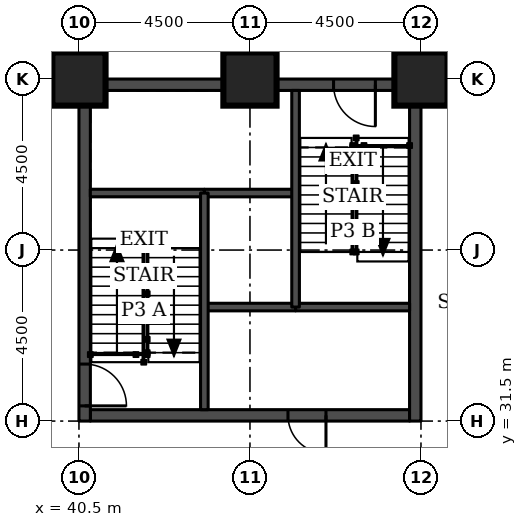
"""IFC4 building model, lengths in metres.
Left out: names, types, materials, properties, quantities, classifications, styles, units other than length and angle.
Written with IfcOpenShell. Run it as: python <this file> out.ifc"""

import sys

from ifc_helpers import new_model, si_unit, direction, frame, frame_2d, origin, origin_2d, place, context, subcontext, project, spatial, rectangle, extrude, element, fill, save


model = new_model("IFC4")
c1 = context("Model", 3, precision=1e-05, world=origin(), true_north=direction((0.0, 1.0)))
c2 = subcontext(c1, "Body", "Model", "MODEL_VIEW")
j1 = project(units=[si_unit("LENGTHUNIT", "METRE"), si_unit("PLANEANGLEUNIT", "RADIAN")], contexts=[c1])
p1 = place(None, origin())
s1 = spatial("IfcSite", under=j1, at=p1, CompositionType="ELEMENT")
p2 = place(p1, origin())
s2 = spatial("IfcBuilding", under=s1, at=p2, CompositionType="ELEMENT")
p3 = place(p2, frame((0.0, 0.0, -4.5)))
s3 = spatial("IfcBuildingStorey", under=s2, at=p3, CompositionType="ELEMENT", Elevation=-4.5)
for number, where, z_axis, x_axis in (
    (1, (40.5, 40.5, 0.0), (0.0, 0.0, 1.0), (1.0, 0.0, 0.0)),
    (2, (45.0, 40.5, 0.0), (0.0, 0.0, 1.0), (1.0, 0.0, 0.0)),
    (3, (49.5, 40.5, 0.0), (0.0, 0.0, 1.0), (1.0, 0.0, 0.0)),
):
    element("IfcColumn", number, at=place(p3, frame(where, z_axis=z_axis, x_axis=x_axis)), inside=s3, PredefinedType="COLUMN", context=c2, shape_type="SweptSolid", body=[
        extrude(rectangle(XDim=1.4, YDim=1.4, at=origin_2d()), origin(), (0.0, 0.0, 1.0), 4.5),
    ])
p4 = place(p3, frame((40.8, 31.65, 0.0), z_axis=(0.0, 0.0, 1.0), x_axis=(1.0, 0.0, 0.0)))
e4 = element("IfcWall", 4, at=p4, inside=s3, PredefinedType="SHEAR", context=c2, shape_type="SweptSolid", body=[
    extrude(rectangle(XDim=8.4, YDim=0.3, at=frame_2d((4.2, 0.0))), origin(), (0.0, 0.0, 1.0), 4.5),
])
p5 = place(p4, frame((5.2, 0.0, 0.0)))
e5 = element("IfcOpeningElement", 5, at=p5, cuts=e4, PredefinedType="OPENING", context=c2, shape_type="SweptSolid", body=[
    extrude(rectangle(XDim=1.0, YDim=2.1, at=frame_2d((0.5, 1.05))), frame((0.0, 0.16, 0.0), z_axis=(0.0, -1.0, 0.0), x_axis=(1.0, 0.0, 0.0)), (0.0, 0.0, 1.0), 0.32),
])
p6 = place(p3, frame((40.8, 40.35, 0.0), z_axis=(0.0, 0.0, 1.0), x_axis=(1.0, 0.0, 0.0)))
e6 = element("IfcWall", 6, at=p6, inside=s3, PredefinedType="SHEAR", context=c2, shape_type="SweptSolid", body=[
    extrude(rectangle(XDim=8.4, YDim=0.3, at=frame_2d((4.2, 0.0))), origin(), (0.0, 0.0, 1.0), 4.5),
])
p7 = place(p6, frame((6.4, 0.0, 0.0)))
e7 = element("IfcOpeningElement", 7, at=p7, cuts=e6, PredefinedType="OPENING", context=c2, shape_type="SweptSolid", body=[
    extrude(rectangle(XDim=1.1, YDim=2.1, at=frame_2d((0.55, 1.05))), frame((0.0, 0.16, 0.0), z_axis=(0.0, -1.0, 0.0), x_axis=(1.0, 0.0, 0.0)), (0.0, 0.0, 1.0), 0.32),
])
p8 = place(p3, frame((40.65, 31.5, 0.0), z_axis=(0.0, 0.0, 1.0), x_axis=(0.0, 1.0, 0.0)))
e8 = element("IfcWall", 8, at=p8, inside=s3, PredefinedType="SHEAR", context=c2, shape_type="SweptSolid", body=[
    extrude(rectangle(XDim=9.0, YDim=0.3, at=frame_2d((4.5, 0.0))), origin(), (0.0, 0.0, 1.0), 4.5),
])
p9 = place(p8, frame((0.4, 0.0, 0.0)))
e9 = element("IfcOpeningElement", 9, at=p9, cuts=e8, PredefinedType="OPENING", context=c2, shape_type="SweptSolid", body=[
    extrude(rectangle(XDim=1.1, YDim=2.1, at=frame_2d((0.55, 1.05))), frame((0.0, 0.16, 0.0), z_axis=(0.0, -1.0, 0.0), x_axis=(1.0, 0.0, 0.0)), (0.0, 0.0, 1.0), 0.32),
])
p10 = place(p3, frame((49.35, 31.5, 0.0), z_axis=(0.0, 0.0, 1.0), x_axis=(0.0, 1.0, 0.0)))
e10 = element("IfcWall", 10, at=p10, inside=s3, PredefinedType="SHEAR", context=c2, shape_type="SweptSolid", body=[
    extrude(rectangle(XDim=9.0, YDim=0.3, at=frame_2d((4.5, 0.0))), origin(), (0.0, 0.0, 1.0), 4.5),
])
p11 = place(p3, frame((43.8, 34.5, 0.0), z_axis=(0.0, 0.0, 1.0), x_axis=(1.0, 0.0, 0.0)))
e11 = element("IfcWall", 11, at=p11, inside=s3, PredefinedType="SOLIDWALL", context=c2, shape_type="SweptSolid", body=[
    extrude(rectangle(XDim=2.4, YDim=0.2, at=frame_2d((1.2, 0.0))), origin(), (0.0, 0.0, 1.0), 4.1),
])
p12 = place(p3, frame((46.2, 34.5, 0.0), z_axis=(0.0, 0.0, 1.0), x_axis=(1.0, 0.0, 0.0)))
e12 = element("IfcWall", 12, at=p12, inside=s3, PredefinedType="SOLIDWALL", context=c2, shape_type="SweptSolid", body=[
    extrude(rectangle(XDim=3.0, YDim=0.2, at=frame_2d((1.5, 0.0))), origin(), (0.0, 0.0, 1.0), 4.1),
])
p13 = place(p3, frame((43.8, 37.5, 0.0), z_axis=(0.0, 0.0, 1.0), x_axis=(1.0, 0.0, 0.0)))
e13 = element("IfcWall", 13, at=p13, inside=s3, PredefinedType="SOLIDWALL", context=c2, shape_type="SweptSolid", body=[
    extrude(rectangle(XDim=2.4, YDim=0.2, at=frame_2d((1.2, 0.0))), origin(), (0.0, 0.0, 1.0), 4.5),
])
p14 = place(p3, frame((40.8, 37.5, 0.0), z_axis=(0.0, 0.0, 1.0), x_axis=(1.0, 0.0, 0.0)))
e14 = element("IfcWall", 14, at=p14, inside=s3, PredefinedType="SOLIDWALL", context=c2, shape_type="SweptSolid", body=[
    extrude(rectangle(XDim=3.0, YDim=0.2, at=frame_2d((1.5, 0.0))), origin(), (0.0, 0.0, 1.0), 4.1),
])
for number, where, z_axis, x_axis in (
    (15, (43.8, 31.8, 0.0), (0.0, 0.0, 1.0), (0.0, 1.0, 0.0)),
    (16, (46.2, 34.5, 0.0), (0.0, 0.0, 1.0), (0.0, 1.0, 0.0)),
):
    element("IfcWall", number, at=place(p3, frame(where, z_axis=z_axis, x_axis=x_axis)), inside=s3, PredefinedType="SOLIDWALL", context=c2, shape_type="SweptSolid", body=[
        extrude(rectangle(XDim=5.7, YDim=0.2, at=frame_2d((2.85, 0.0))), origin(), (0.0, 0.0, 1.0), 4.1),
    ])
p15 = place(p9, frame((1.1, 0.0, 0.0), z_axis=(0.0, 0.0, 1.0), x_axis=(-1.0, 0.0, 0.0)))
e17 = element("IfcDoor", 17, at=p15, inside=s3, OperationType="SINGLE_SWING_RIGHT", PredefinedType="DOOR", context=c2, shape_type="SweptSolid", body=[
    extrude(rectangle(XDim=1.1, YDim=2.1, at=frame_2d((0.55, 1.05))), frame((0.0, 0.025, 0.0), z_axis=(0.0, -1.0, 0.0), x_axis=(1.0, 0.0, 0.0)), (0.0, 0.0, 1.0), 0.05),
])
fill(e9, e17)
p16 = place(p7, frame((1.1, 0.0, 0.0), z_axis=(0.0, 0.0, 1.0), x_axis=(-1.0, 0.0, 0.0)))
e18 = element("IfcDoor", 18, at=p16, inside=s3, OperationType="SINGLE_SWING_LEFT", PredefinedType="DOOR", context=c2, shape_type="SweptSolid", body=[
    extrude(rectangle(XDim=1.1, YDim=2.1, at=frame_2d((0.55, 1.05))), frame((0.0, 0.025, 0.0), z_axis=(0.0, -1.0, 0.0), x_axis=(1.0, 0.0, 0.0)), (0.0, 0.0, 1.0), 0.05),
])
fill(e7, e18)
p17 = place(p5, frame((1.0, 0.0, 0.0), z_axis=(0.0, 0.0, 1.0), x_axis=(-1.0, 0.0, 0.0)))
e19 = element("IfcDoor", 19, at=p17, inside=s3, OperationType="SINGLE_SWING_LEFT", PredefinedType="DOOR", context=c2, shape_type="SweptSolid", body=[
    extrude(rectangle(XDim=1.0, YDim=2.1, at=frame_2d((0.5, 1.05))), frame((0.0, 0.025, 0.0), z_axis=(0.0, -1.0, 0.0), x_axis=(1.0, 0.0, 0.0)), (0.0, 0.0, 1.0), 0.05),
])
fill(e5, e19)
save(model, sys.argv[1])
